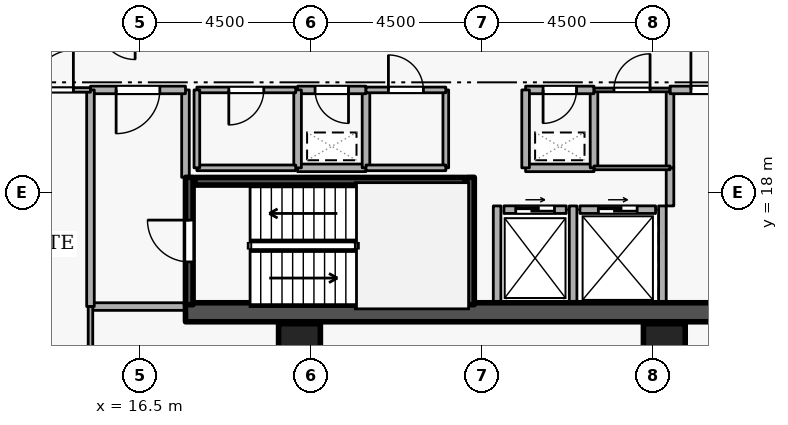
"""IFC4 building model, lengths in metres.
Left out: names, types, materials, properties, quantities, classifications, styles, units other than length and angle.
Written with IfcOpenShell. Run it as: python <this file> out.ifc"""

import sys

from ifc_helpers import new_model, si_unit, direction, frame, frame_2d, origin, origin_2d, place, context, subcontext, project, spatial, rectangle, extrude, element, fill, save


model = new_model("IFC4")
c1 = context("Model", 3, precision=1e-05, world=origin(), true_north=direction((0.0, 1.0)))
c2 = subcontext(c1, "Body", "Model", "MODEL_VIEW")
j1 = project(units=[si_unit("LENGTHUNIT", "METRE"), si_unit("PLANEANGLEUNIT", "RADIAN")], contexts=[c1])
p1 = place(None, origin())
s1 = spatial("IfcSite", under=j1, at=p1, CompositionType="ELEMENT")
p2 = place(p1, origin())
s2 = spatial("IfcBuilding", under=s1, at=p2, CompositionType="ELEMENT")
p3 = place(p2, frame((0.0, 0.0, 192.9)))
s3 = spatial("IfcBuildingStorey", under=s2, at=p3, CompositionType="ELEMENT", Elevation=192.9)
p4 = place(p3, frame((17.7, 14.85, 0.0), z_axis=(0.0, 0.0, 1.0), x_axis=(1.0, 0.0, 0.0)))
e1 = element("IfcWall", 1, at=p4, inside=s3, PredefinedType="SHEAR", context=c2, shape_type="SweptSolid", body=[
    extrude(rectangle(XDim=15.6, YDim=0.5, at=frame_2d((7.8, 0.0))), origin(), (0.0, 0.0, 1.0), 3.6),
])
for number, where, z_axis, x_axis in (
    (2, (20.7, 14.0, 0.0), (0.0, 0.0, 1.0), (1.0, 0.0, 0.0)),
    (3, (30.3, 14.0, 0.0), (0.0, 0.0, 1.0), (1.0, 0.0, 0.0)),
):
    element("IfcColumn", number, at=place(p3, frame(where, z_axis=z_axis, x_axis=x_axis)), inside=s3, PredefinedType="COLUMN", context=c2, shape_type="SweptSolid", body=[
        extrude(rectangle(XDim=1.1, YDim=1.1, at=origin_2d()), origin(), (0.0, 0.0, 1.0), 3.6),
    ])
p5 = place(p3, frame((26.08, 17.55, 0.0), z_axis=(0.0, 0.0, 1.0), x_axis=(1.0, 0.0, 0.0)))
e4 = element("IfcWall", 4, at=p5, inside=s3, PredefinedType="STANDARD", context=c2, shape_type="SweptSolid", body=[
    extrude(rectangle(XDim=1.64, YDim=0.2, at=frame_2d((0.82, 0.0))), origin(), (0.0, 0.0, 1.0), 3.34),
])
p6 = place(p5, frame((0.31, 0.0, 0.0)))
e5 = element("IfcOpeningElement", 5, at=p6, cuts=e4, PredefinedType="OPENING", context=c2, shape_type="SweptSolid", body=[
    extrude(rectangle(XDim=1.02, YDim=2.06, at=frame_2d((0.51, 1.03))), frame((0.0, 0.11, 0.0), z_axis=(0.0, -1.0, 0.0), x_axis=(1.0, 0.0, 0.0)), (0.0, 0.0, 1.0), 0.22),
])
p7 = place(p3, frame((28.08, 17.55, 0.0), z_axis=(0.0, 0.0, 1.0), x_axis=(1.0, 0.0, 0.0)))
e6 = element("IfcWall", 6, at=p7, inside=s3, PredefinedType="STANDARD", context=c2, shape_type="SweptSolid", body=[
    extrude(rectangle(XDim=1.99, YDim=0.2, at=frame_2d((0.995, 0.0))), origin(), (0.0, 0.0, 1.0), 3.34),
])
p8 = place(p7, frame((0.485, 0.0, 0.0)))
e7 = element("IfcOpeningElement", 7, at=p8, cuts=e6, PredefinedType="OPENING", context=c2, shape_type="SweptSolid", body=[
    extrude(rectangle(XDim=1.02, YDim=2.06, at=frame_2d((0.51, 1.03))), frame((0.0, 0.11, 0.0), z_axis=(0.0, -1.0, 0.0), x_axis=(1.0, 0.0, 0.0)), (0.0, 0.0, 1.0), 0.22),
])
for number, where, z_axis, x_axis in (
    (8, (27.9, 15.112, 0.0), (0.0, 0.0, 1.0), (0.0, 1.0, 0.0)),
    (9, (25.9, 15.112, 0.0), (0.0, 0.0, 1.0), (0.0, 1.0, 0.0)),
    (10, (30.25, 15.112, 0.0), (0.0, 0.0, 1.0), (0.0, 1.0, 0.0)),
):
    element("IfcWall", number, at=place(p3, frame(where, z_axis=z_axis, x_axis=x_axis)), inside=s3, PredefinedType="STANDARD", context=c2, shape_type="SweptSolid", body=[
        extrude(rectangle(XDim=2.536, YDim=0.2, at=frame_2d((1.268, 0.0))), origin(), (0.0, 0.0, 1.0), 3.34),
    ])
p9 = place(p3, frame((17.8, 15.05, 0.0), z_axis=(0.0, 0.0, 1.0), x_axis=(0.0, 1.0, 0.0)))
e11 = element("IfcWall", 11, at=p9, inside=s3, PredefinedType="SHEAR", context=c2, shape_type="SweptSolid", body=[
    extrude(rectangle(XDim=3.35, YDim=0.2, at=frame_2d((1.675, 0.0))), origin(), (0.0, 0.0, 1.0), 3.6),
])
p10 = place(p9, frame((1.125, 0.0, 0.0)))
e12 = element("IfcOpeningElement", 12, at=p10, cuts=e11, PredefinedType="OPENING", context=c2, shape_type="SweptSolid", body=[
    extrude(rectangle(XDim=1.1, YDim=2.1, at=frame_2d((0.55, 1.05))), frame((0.0, 0.11, 0.0), z_axis=(0.0, -1.0, 0.0), x_axis=(1.0, 0.0, 0.0)), (0.0, 0.0, 1.0), 0.22),
])
p11 = place(p3, frame((25.2, 18.4, 0.0), z_axis=(0.0, 0.0, 1.0), x_axis=(0.0, -1.0, 0.0)))
e13 = element("IfcWall", 13, at=p11, inside=s3, PredefinedType="SHEAR", context=c2, shape_type="SweptSolid", body=[
    extrude(rectangle(XDim=3.35, YDim=0.2, at=frame_2d((1.675, 0.0))), origin(), (0.0, 0.0, 1.0), 3.6),
])
p12 = place(p3, frame((25.05, 18.297, 0.0), z_axis=(0.0, 0.0, 1.0), x_axis=(-1.0, 0.0, 0.0)))
e14 = element("IfcWall", 14, at=p12, inside=s3, PredefinedType="SHEAR", context=c2, shape_type="SweptSolid", body=[
    extrude(rectangle(XDim=7.1, YDim=0.2, at=frame_2d((3.55, 0.0))), origin(), (0.0, 0.0, 1.0), 3.6),
])
p13 = place(p3, frame((15.2, 15.0, 0.0), z_axis=(0.0, 0.0, 1.0), x_axis=(1.0, 0.0, 0.0)))
e15 = element("IfcWall", 15, at=p13, inside=s3, PredefinedType="STANDARD", context=c2, shape_type="SweptSolid", body=[
    extrude(rectangle(XDim=2.5, YDim=0.2, at=frame_2d((1.25, 0.0))), origin(), (0.0, 0.0, 1.0), 3.34),
])
p14 = place(p3, frame((17.7, 18.4, 0.0), z_axis=(0.0, 0.0, 1.0), x_axis=(0.0, 1.0, 0.0)))
e16 = element("IfcWall", 16, at=p14, inside=s3, PredefinedType="STANDARD", context=c2, shape_type="SweptSolid", body=[
    extrude(rectangle(XDim=2.3, YDim=0.2, at=frame_2d((1.15, 0.0))), origin(), (0.0, 0.0, 1.0), 2.545),
])
p15 = place(p3, frame((17.7, 20.7, 0.0), z_axis=(0.0, 0.0, 1.0), x_axis=(-1.0, 0.0, 0.0)))
e17 = element("IfcWall", 17, at=p15, inside=s3, PredefinedType="STANDARD", context=c2, shape_type="SweptSolid", body=[
    extrude(rectangle(XDim=2.5, YDim=0.2, at=frame_2d((1.25, 0.0))), origin(), (0.0, 0.0, 1.0), 3.34),
])
p16 = place(p15, frame((0.675, 0.0, 0.0)))
e18 = element("IfcOpeningElement", 18, at=p16, cuts=e17, PredefinedType="OPENING", context=c2, shape_type="SweptSolid", body=[
    extrude(rectangle(XDim=1.15, YDim=2.1, at=frame_2d((0.575, 1.05))), frame((0.0, 0.11, 0.0), z_axis=(0.0, -1.0, 0.0), x_axis=(1.0, 0.0, 0.0)), (0.0, 0.0, 1.0), 0.22),
])
p17 = place(p3, frame((15.2, 20.7, 0.0), z_axis=(0.0, 0.0, 1.0), x_axis=(0.0, -1.0, 0.0)))
e19 = element("IfcWall", 19, at=p17, inside=s3, PredefinedType="STANDARD", context=c2, shape_type="SweptSolid", body=[
    extrude(rectangle(XDim=5.7, YDim=0.2, at=frame_2d((2.85, 0.0))), origin(), (0.0, 0.0, 1.0), 3.34),
])
p18 = place(p3, frame((26.65, 18.65, 0.0), z_axis=(0.0, 0.0, 1.0), x_axis=(1.0, 0.0, 0.0)))
e20 = element("IfcWall", 20, at=p18, inside=s3, PredefinedType="STANDARD", context=c2, shape_type="SweptSolid", body=[
    extrude(rectangle(XDim=1.8, YDim=0.2, at=frame_2d((0.9, 0.0))), origin(), (0.0, 0.0, 1.0), 3.34),
])
p19 = place(p3, frame((28.45, 18.65, 0.0), z_axis=(0.0, 0.0, 1.0), x_axis=(0.0, 1.0, 0.0)))
e21 = element("IfcWall", 21, at=p19, inside=s3, PredefinedType="STANDARD", context=c2, shape_type="SweptSolid", body=[
    extrude(rectangle(XDim=2.05, YDim=0.2, at=frame_2d((1.025, 0.0))), origin(), (0.0, 0.0, 1.0), 3.34),
])
p20 = place(p3, frame((28.45, 20.7, 0.0), z_axis=(0.0, 0.0, 1.0), x_axis=(-1.0, 0.0, 0.0)))
e22 = element("IfcWall", 22, at=p20, inside=s3, PredefinedType="STANDARD", context=c2, shape_type="SweptSolid", body=[
    extrude(rectangle(XDim=1.8, YDim=0.2, at=frame_2d((0.9, 0.0))), origin(), (0.0, 0.0, 1.0), 3.34),
])
p21 = place(p20, frame((0.46, 0.0, 0.0)))
e23 = element("IfcOpeningElement", 23, at=p21, cuts=e22, PredefinedType="OPENING", context=c2, shape_type="SweptSolid", body=[
    extrude(rectangle(XDim=0.88, YDim=2.04, at=frame_2d((0.44, 1.02))), frame((0.0, 0.11, 0.0), z_axis=(0.0, -1.0, 0.0), x_axis=(1.0, 0.0, 0.0)), (0.0, 0.0, 1.0), 0.22),
])
p22 = place(p3, frame((26.65, 20.7, 0.0), z_axis=(0.0, 0.0, 1.0), x_axis=(0.0, -1.0, 0.0)))
e24 = element("IfcWall", 24, at=p22, inside=s3, PredefinedType="STANDARD", context=c2, shape_type="SweptSolid", body=[
    extrude(rectangle(XDim=2.05, YDim=0.2, at=frame_2d((1.025, 0.0))), origin(), (0.0, 0.0, 1.0), 3.34),
])
p23 = place(p3, frame((20.65, 18.65, 0.0), z_axis=(0.0, 0.0, 1.0), x_axis=(1.0, 0.0, 0.0)))
e25 = element("IfcWall", 25, at=p23, inside=s3, PredefinedType="STANDARD", context=c2, shape_type="SweptSolid", body=[
    extrude(rectangle(XDim=1.8, YDim=0.2, at=frame_2d((0.9, 0.0))), origin(), (0.0, 0.0, 1.0), 3.34),
])
p24 = place(p3, frame((22.45, 18.65, 0.0), z_axis=(0.0, 0.0, 1.0), x_axis=(0.0, 1.0, 0.0)))
e26 = element("IfcWall", 26, at=p24, inside=s3, PredefinedType="STANDARD", context=c2, shape_type="SweptSolid", body=[
    extrude(rectangle(XDim=2.05, YDim=0.2, at=frame_2d((1.025, 0.0))), origin(), (0.0, 0.0, 1.0), 3.34),
])
p25 = place(p3, frame((22.45, 20.7, 0.0), z_axis=(0.0, 0.0, 1.0), x_axis=(-1.0, 0.0, 0.0)))
e27 = element("IfcWall", 27, at=p25, inside=s3, PredefinedType="STANDARD", context=c2, shape_type="SweptSolid", body=[
    extrude(rectangle(XDim=1.8, YDim=0.2, at=frame_2d((0.9, 0.0))), origin(), (0.0, 0.0, 1.0), 3.34),
])
p26 = place(p25, frame((0.46, 0.0, 0.0)))
e28 = element("IfcOpeningElement", 28, at=p26, cuts=e27, PredefinedType="OPENING", context=c2, shape_type="SweptSolid", body=[
    extrude(rectangle(XDim=0.88, YDim=2.04, at=frame_2d((0.44, 1.02))), frame((0.0, 0.11, 0.0), z_axis=(0.0, -1.0, 0.0), x_axis=(1.0, 0.0, 0.0)), (0.0, 0.0, 1.0), 0.22),
])
p27 = place(p3, frame((20.65, 20.7, 0.0), z_axis=(0.0, 0.0, 1.0), x_axis=(0.0, -1.0, 0.0)))
e29 = element("IfcWall", 29, at=p27, inside=s3, PredefinedType="STANDARD", context=c2, shape_type="SweptSolid", body=[
    extrude(rectangle(XDim=2.05, YDim=0.2, at=frame_2d((1.025, 0.0))), origin(), (0.0, 0.0, 1.0), 3.34),
])
p28 = place(p3, frame((30.45, 17.648, 0.0), z_axis=(0.0, 0.0, 1.0), x_axis=(0.0, 1.0, 0.0)))
e30 = element("IfcWall", 30, at=p28, inside=s3, PredefinedType="STANDARD", context=c2, shape_type="SweptSolid", body=[
    extrude(rectangle(XDim=1.002, YDim=0.2, at=frame_2d((0.501, 0.0))), origin(), (0.0, 0.0, 1.0), 3.34),
])
p29 = place(p3, frame((30.45, 18.65, 0.0), z_axis=(0.0, 0.0, 1.0), x_axis=(0.0, 1.0, 0.0)))
e31 = element("IfcWall", 31, at=p29, inside=s3, PredefinedType="STANDARD", context=c2, shape_type="SweptSolid", body=[
    extrude(rectangle(XDim=2.05, YDim=0.2, at=frame_2d((1.025, 0.0))), origin(), (0.0, 0.0, 1.0), 3.34),
])
p30 = place(p3, frame((30.45, 20.7, 0.0), z_axis=(0.0, 0.0, 1.0), x_axis=(1.0, 0.0, 0.0)))
e32 = element("IfcWall", 32, at=p30, inside=s3, PredefinedType="STANDARD", context=c2, shape_type="SweptSolid", body=[
    extrude(rectangle(XDim=2.25, YDim=0.2, at=frame_2d((1.125, 0.0))), origin(), (0.0, 0.0, 1.0), 3.34),
])
p31 = place(p30, frame((0.55, 0.0, 0.0)))
e33 = element("IfcOpeningElement", 33, at=p31, cuts=e32, PredefinedType="OPENING", context=c2, shape_type="SweptSolid", body=[
    extrude(rectangle(XDim=1.15, YDim=2.1, at=frame_2d((0.575, 1.05))), frame((0.0, 0.11, 0.0), z_axis=(0.0, -1.0, 0.0), x_axis=(1.0, 0.0, 0.0)), (0.0, 0.0, 1.0), 0.22),
])
p32 = place(p3, frame((18.0, 18.65, 0.0), z_axis=(0.0, 0.0, 1.0), x_axis=(1.0, 0.0, 0.0)))
e34 = element("IfcWall", 34, at=p32, inside=s3, PredefinedType="PARTITIONING", context=c2, shape_type="SweptSolid", body=[
    extrude(rectangle(XDim=2.6, YDim=0.15, at=frame_2d((1.3, 0.0))), origin(), (0.0, 0.0, 1.0), 3.34),
])
p33 = place(p3, frame((20.6, 20.7, 0.0), z_axis=(0.0, 0.0, 1.0), x_axis=(-1.0, 0.0, 0.0)))
e35 = element("IfcWall", 35, at=p33, inside=s3, PredefinedType="PARTITIONING", context=c2, shape_type="SweptSolid", body=[
    extrude(rectangle(XDim=2.6, YDim=0.15, at=frame_2d((1.3, 0.0))), origin(), (0.0, 0.0, 1.0), 3.34),
])
p34 = place(p33, frame((0.84, 0.0, 0.0)))
e36 = element("IfcOpeningElement", 36, at=p34, cuts=e35, PredefinedType="OPENING", context=c2, shape_type="SweptSolid", body=[
    extrude(rectangle(XDim=0.92, YDim=2.08, at=frame_2d((0.46, 1.04))), frame((0.0, 0.085, 0.0), z_axis=(0.0, -1.0, 0.0), x_axis=(1.0, 0.0, 0.0)), (0.0, 0.0, 1.0), 0.17),
])
p35 = place(p3, frame((18.0, 20.7, 0.0), z_axis=(0.0, 0.0, 1.0), x_axis=(0.0, -1.0, 0.0)))
e37 = element("IfcWall", 37, at=p35, inside=s3, PredefinedType="PARTITIONING", context=c2, shape_type="SweptSolid", body=[
    extrude(rectangle(XDim=2.05, YDim=0.15, at=frame_2d((1.025, 0.0))), origin(), (0.0, 0.0, 1.0), 2.545),
])
p36 = place(p3, frame((24.55, 20.7, 0.0), z_axis=(0.0, 0.0, 1.0), x_axis=(0.0, -1.0, 0.0)))
e38 = element("IfcWall", 38, at=p36, inside=s3, PredefinedType="PARTITIONING", context=c2, shape_type="SweptSolid", body=[
    extrude(rectangle(XDim=2.05, YDim=0.15, at=frame_2d((1.025, 0.0))), origin(), (0.0, 0.0, 1.0), 3.34),
])
p37 = place(p3, frame((24.55, 18.65, 0.0), z_axis=(0.0, 0.0, 1.0), x_axis=(-1.0, 0.0, 0.0)))
e39 = element("IfcWall", 39, at=p37, inside=s3, PredefinedType="PARTITIONING", context=c2, shape_type="SweptSolid", body=[
    extrude(rectangle(XDim=2.1, YDim=0.15, at=frame_2d((1.05, 0.0))), origin(), (0.0, 0.0, 1.0), 3.34),
])
p38 = place(p3, frame((22.45, 20.7, 0.0), z_axis=(0.0, 0.0, 1.0), x_axis=(1.0, 0.0, 0.0)))
e40 = element("IfcWall", 40, at=p38, inside=s3, PredefinedType="PARTITIONING", context=c2, shape_type="SweptSolid", body=[
    extrude(rectangle(XDim=2.1, YDim=0.15, at=frame_2d((1.05, 0.0))), origin(), (0.0, 0.0, 1.0), 3.34),
])
p39 = place(p38, frame((0.59, 0.0, 0.0)))
e41 = element("IfcOpeningElement", 41, at=p39, cuts=e40, PredefinedType="OPENING", context=c2, shape_type="SweptSolid", body=[
    extrude(rectangle(XDim=0.92, YDim=2.08, at=frame_2d((0.46, 1.04))), frame((0.0, 0.085, 0.0), z_axis=(0.0, -1.0, 0.0), x_axis=(1.0, 0.0, 0.0)), (0.0, 0.0, 1.0), 0.17),
])
p40 = place(p3, frame((30.45, 18.65, 0.0), z_axis=(0.0, 0.0, 1.0), x_axis=(-1.0, 0.0, 0.0)))
e42 = element("IfcWall", 42, at=p40, inside=s3, PredefinedType="PARTITIONING", context=c2, shape_type="SweptSolid", body=[
    extrude(rectangle(XDim=2.0, YDim=0.1, at=frame_2d((1.0, 0.0))), origin(), (0.0, 0.0, 1.0), 3.34),
])
p41 = place(p3, frame((28.45, 20.7, 0.0), z_axis=(0.0, 0.0, 1.0), x_axis=(1.0, 0.0, 0.0)))
e43 = element("IfcWall", 43, at=p41, inside=s3, PredefinedType="PARTITIONING", context=c2, shape_type="SweptSolid", body=[
    extrude(rectangle(XDim=2.0, YDim=0.1, at=frame_2d((1.0, 0.0))), origin(), (0.0, 0.0, 1.0), 3.34),
])
p42 = place(p41, frame((0.525, 0.0, 0.0)))
e44 = element("IfcOpeningElement", 44, at=p42, cuts=e43, PredefinedType="OPENING", context=c2, shape_type="SweptSolid", body=[
    extrude(rectangle(XDim=0.95, YDim=2.1, at=frame_2d((0.475, 1.05))), frame((0.0, 0.06, 0.0), z_axis=(0.0, -1.0, 0.0), x_axis=(1.0, 0.0, 0.0)), (0.0, 0.0, 1.0), 0.12),
])
p43 = place(p3, frame((13.25, 20.7, 0.0), z_axis=(0.0, 0.0, 1.0), x_axis=(1.0, 0.0, 0.0)))
e45 = element("IfcWall", 45, at=p43, inside=s3, PredefinedType="PARTITIONING", context=c2, shape_type="SweptSolid", body=[
    extrude(rectangle(XDim=1.95, YDim=0.12, at=frame_2d((0.975, 0.0))), origin(), (0.0, 0.0, 1.0), 3.34),
])
p44 = place(p43, frame((0.45, 0.0, 0.0)))
e46 = element("IfcOpeningElement", 46, at=p44, cuts=e45, PredefinedType="OPENING", context=c2, shape_type="SweptSolid", body=[
    extrude(rectangle(XDim=1.05, YDim=2.1, at=frame_2d((0.525, 1.05))), frame((0.0, 0.07, 0.0), z_axis=(0.0, -1.0, 0.0), x_axis=(1.0, 0.0, 0.0)), (0.0, 0.0, 1.0), 0.14),
])
p45 = place(p3, frame((15.2, 15.0, 0.0), z_axis=(0.0, 0.0, 1.0), x_axis=(0.0, -1.0, 0.0)))
e47 = element("IfcWall", 47, at=p45, inside=s3, PredefinedType="PARTITIONING", context=c2, shape_type="SweptSolid", body=[
    extrude(rectangle(XDim=5.72, YDim=0.12, at=frame_2d((2.86, 0.0))), origin(), (0.0, 0.0, 1.0), 3.34),
])
p46 = place(p6, origin())
e48 = element("IfcDoor", 48, at=p46, inside=s3, OperationType="SLIDING_TO_LEFT", PredefinedType="DOOR", context=c2, shape_type="SweptSolid", body=[
    extrude(rectangle(XDim=1.02, YDim=2.06, at=frame_2d((0.51, 1.03))), frame((0.0, 0.025, 0.0), z_axis=(0.0, -1.0, 0.0), x_axis=(1.0, 0.0, 0.0)), (0.0, 0.0, 1.0), 0.05),
])
fill(e5, e48)
p47 = place(p8, origin())
e49 = element("IfcDoor", 49, at=p47, inside=s3, OperationType="SLIDING_TO_LEFT", PredefinedType="DOOR", context=c2, shape_type="SweptSolid", body=[
    extrude(rectangle(XDim=1.02, YDim=2.06, at=frame_2d((0.51, 1.03))), frame((0.0, 0.025, 0.0), z_axis=(0.0, -1.0, 0.0), x_axis=(1.0, 0.0, 0.0)), (0.0, 0.0, 1.0), 0.05),
])
fill(e7, e49)
p48 = place(p10, origin())
e50 = element("IfcDoor", 50, at=p48, inside=s3, OperationType="SINGLE_SWING_RIGHT", PredefinedType="DOOR", context=c2, shape_type="SweptSolid", body=[
    extrude(rectangle(XDim=1.1, YDim=2.1, at=frame_2d((0.55, 1.05))), frame((0.0, 0.025, 0.0), z_axis=(0.0, -1.0, 0.0), x_axis=(1.0, 0.0, 0.0)), (0.0, 0.0, 1.0), 0.05),
])
fill(e12, e50)
p49 = place(p16, origin())
e51 = element("IfcDoor", 51, at=p49, inside=s3, OperationType="SINGLE_SWING_RIGHT", PredefinedType="DOOR", context=c2, shape_type="SweptSolid", body=[
    extrude(rectangle(XDim=1.15, YDim=2.1, at=frame_2d((0.575, 1.05))), frame((0.0, 0.025, 0.0), z_axis=(0.0, -1.0, 0.0), x_axis=(1.0, 0.0, 0.0)), (0.0, 0.0, 1.0), 0.05),
])
fill(e18, e51)
p50 = place(p21, origin())
e52 = element("IfcDoor", 52, at=p50, inside=s3, OperationType="SINGLE_SWING_RIGHT", PredefinedType="DOOR", context=c2, shape_type="SweptSolid", body=[
    extrude(rectangle(XDim=0.88, YDim=2.04, at=frame_2d((0.44, 1.02))), frame((0.0, 0.025, 0.0), z_axis=(0.0, -1.0, 0.0), x_axis=(1.0, 0.0, 0.0)), (0.0, 0.0, 1.0), 0.05),
])
fill(e23, e52)
p51 = place(p26, origin())
e53 = element("IfcDoor", 53, at=p51, inside=s3, OperationType="SINGLE_SWING_LEFT", PredefinedType="DOOR", context=c2, shape_type="SweptSolid", body=[
    extrude(rectangle(XDim=0.88, YDim=2.04, at=frame_2d((0.44, 1.02))), frame((0.0, 0.025, 0.0), z_axis=(0.0, -1.0, 0.0), x_axis=(1.0, 0.0, 0.0)), (0.0, 0.0, 1.0), 0.05),
])
fill(e28, e53)
p52 = place(p34, origin())
e54 = element("IfcDoor", 54, at=p52, inside=s3, OperationType="SINGLE_SWING_RIGHT", PredefinedType="DOOR", context=c2, shape_type="SweptSolid", body=[
    extrude(rectangle(XDim=0.92, YDim=2.08, at=frame_2d((0.46, 1.04))), frame((0.0, 0.025, 0.0), z_axis=(0.0, -1.0, 0.0), x_axis=(1.0, 0.0, 0.0)), (0.0, 0.0, 1.0), 0.05),
])
fill(e36, e54)
p53 = place(p39, origin())
e55 = element("IfcDoor", 55, at=p53, inside=s3, OperationType="SINGLE_SWING_LEFT", PredefinedType="DOOR", context=c2, shape_type="SweptSolid", body=[
    extrude(rectangle(XDim=0.92, YDim=2.08, at=frame_2d((0.46, 1.04))), frame((0.0, 0.025, 0.0), z_axis=(0.0, -1.0, 0.0), x_axis=(1.0, 0.0, 0.0)), (0.0, 0.0, 1.0), 0.05),
])
fill(e41, e55)
p54 = place(p42, origin())
e56 = element("IfcDoor", 56, at=p54, inside=s3, OperationType="SINGLE_SWING_RIGHT", PredefinedType="DOOR", context=c2, shape_type="SweptSolid", body=[
    extrude(rectangle(XDim=0.95, YDim=2.1, at=frame_2d((0.475, 1.05))), frame((0.0, 0.025, 0.0), z_axis=(0.0, -1.0, 0.0), x_axis=(1.0, 0.0, 0.0)), (0.0, 0.0, 1.0), 0.05),
])
fill(e44, e56)
p55 = place(p31, origin())
e57 = element("IfcDoor", 57, at=p55, inside=s3, OperationType="SINGLE_SWING_LEFT", PredefinedType="DOOR", context=c2, shape_type="SweptSolid", body=[
    extrude(rectangle(XDim=1.15, YDim=2.1, at=frame_2d((0.575, 1.05))), frame((0.0, 0.025, 0.0), z_axis=(0.0, -1.0, 0.0), x_axis=(1.0, 0.0, 0.0)), (0.0, 0.0, 1.0), 0.05),
])
fill(e33, e57)
p56 = place(p44, origin())
e58 = element("IfcDoor", 58, at=p56, inside=s3, OperationType="SINGLE_SWING_RIGHT", PredefinedType="DOOR", context=c2, shape_type="SweptSolid", body=[
    extrude(rectangle(XDim=1.05, YDim=2.1, at=frame_2d((0.525, 1.05))), frame((0.0, 0.025, 0.0), z_axis=(0.0, -1.0, 0.0), x_axis=(1.0, 0.0, 0.0)), (0.0, 0.0, 1.0), 0.05),
])
fill(e46, e58)
save(model, sys.argv[1])
